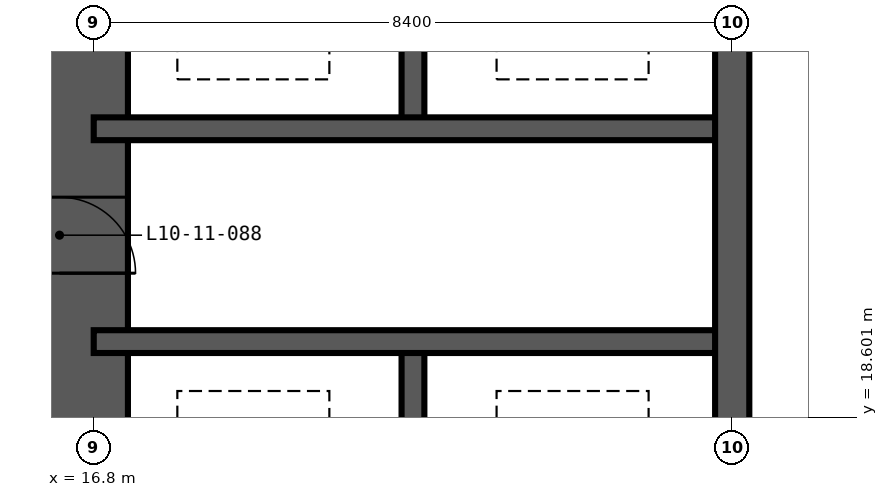
"""IFC4 building model, lengths in metres.
Left out: names, types, materials, properties, quantities, classifications, styles, units other than length and angle.
Written with IfcOpenShell. Run it as: python <this file> out.ifc"""

import sys

from ifc_helpers import new_model, si_unit, direction, frame, frame_2d, origin, place, context, subcontext, project, spatial, rectangle, extrude, element, fill, save


model = new_model("IFC4")
c1 = context("Model", 3, precision=1e-05, world=origin(), true_north=direction((0.0, 1.0)))
c2 = subcontext(c1, "Body", "Model", "MODEL_VIEW")
j1 = project(units=[si_unit("LENGTHUNIT", "METRE"), si_unit("PLANEANGLEUNIT", "RADIAN")], contexts=[c1])
p1 = place(None, origin())
s1 = spatial("IfcSite", under=j1, at=p1, CompositionType="ELEMENT")
p2 = place(p1, origin())
s2 = spatial("IfcBuilding", under=s1, at=p2, CompositionType="ELEMENT")
p3 = place(p2, frame((0.0, 0.0, 45.0)))
s3 = spatial("IfcBuildingStorey", under=s2, at=p3, CompositionType="ELEMENT", Elevation=45.0)
p4 = place(p3, frame((16.35, 41.55, -0.35), z_axis=(0.0, 0.0, 1.0), x_axis=(0.0, -1.0, 0.0)))
e1 = element("IfcWall", 1, at=p4, inside=s3, PredefinedType="SHEAR", context=c2, shape_type="SweptSolid", body=[
    extrude(rectangle(XDim=24.3, YDim=1.8, at=frame_2d((12.15, 0.0))), origin(), (0.0, 0.0, 1.0), 3.6),
])
p5 = place(p4, frame((11.25, 0.0, 0.35)))
e2 = element("IfcOpeningElement", 2, at=p5, cuts=e1, PredefinedType="OPENING", context=c2, shape_type="SweptSolid", body=[
    extrude(rectangle(XDim=1.8, YDim=2.2, at=frame_2d((0.9, 1.1))), frame((0.0, 0.91, 0.0), z_axis=(0.0, -1.0, 0.0), x_axis=(1.0, 0.0, 0.0)), (0.0, 0.0, 1.0), 1.82),
])
p6 = place(p4, frame((20.05, 0.0, 0.35)))
e3 = element("IfcOpeningElement", 3, at=p6, cuts=e1, PredefinedType="OPENING", context=c2, shape_type="SweptSolid", body=[
    extrude(rectangle(XDim=1.0, YDim=2.1, at=frame_2d((0.5, 1.05))), frame((0.0, 0.91, 0.0), z_axis=(0.0, -1.0, 0.0), x_axis=(1.0, 0.0, 0.0)), (0.0, 0.0, 1.0), 1.82),
])
p7 = place(p4, frame((5.35, 0.0, 0.35)))
e4 = element("IfcOpeningElement", 4, at=p7, cuts=e1, PredefinedType="OPENING", context=c2, shape_type="SweptSolid", body=[
    extrude(rectangle(XDim=1.0, YDim=2.1, at=frame_2d((0.5, 1.05))), frame((0.0, 0.91, 0.0), z_axis=(0.0, -1.0, 0.0), x_axis=(1.0, 0.0, 0.0)), (0.0, 0.0, 1.0), 1.82),
])
for number, where, z_axis, x_axis in (
    (5, (21.0, 16.8, -0.35), (0.0, 0.0, 1.0), (0.0, 1.0, 0.0)),
    (6, (21.0, 22.4, -0.35), (0.0, 0.0, 1.0), (0.0, 1.0, 0.0)),
):
    element("IfcWall", number, at=place(p3, frame(where, z_axis=z_axis, x_axis=x_axis)), inside=s3, PredefinedType="SHEAR", context=c2, shape_type="SweptSolid", body=[
        extrude(rectangle(XDim=2.8, YDim=0.3, at=frame_2d((1.4, 0.0))), origin(), (0.0, 0.0, 1.0), 3.6),
    ])
for number, where, z_axis, x_axis in (
    (7, (16.8, 19.6, -0.35), (0.0, 0.0, 1.0), (1.0, 0.0, 0.0)),
    (8, (16.8, 22.4, -0.35), (0.0, 0.0, 1.0), (1.0, 0.0, 0.0)),
):
    element("IfcWall", number, at=place(p3, frame(where, z_axis=z_axis, x_axis=x_axis)), inside=s3, PredefinedType="SHEAR", context=c2, shape_type="SweptSolid", body=[
        extrude(rectangle(XDim=8.4, YDim=0.3, at=frame_2d((4.2, 0.0))), origin(), (0.0, 0.0, 1.0), 3.6),
    ])
p8 = place(p3, frame((25.2, 16.8, -0.35), z_axis=(0.0, 0.0, 1.0), x_axis=(0.0, 1.0, 0.0)))
e9 = element("IfcWall", 9, at=p8, inside=s3, PredefinedType="SHEAR", context=c2, shape_type="SweptSolid", body=[
    extrude(rectangle(XDim=25.2, YDim=0.45, at=frame_2d((12.6, 0.0))), origin(), (0.0, 0.0, 1.0), 3.6),
])
p9 = place(p6, origin())
e10 = element("IfcDoor", 10, at=p9, inside=s3, OperationType="SINGLE_SWING_RIGHT", PredefinedType="DOOR", context=c2, shape_type="SweptSolid", body=[
    extrude(rectangle(XDim=1.0, YDim=2.1, at=frame_2d((0.5, 1.05))), frame((0.0, 0.025, 0.0), z_axis=(0.0, -1.0, 0.0), x_axis=(1.0, 0.0, 0.0)), (0.0, 0.0, 1.0), 0.05),
])
fill(e3, e10)
save(model, sys.argv[1])
